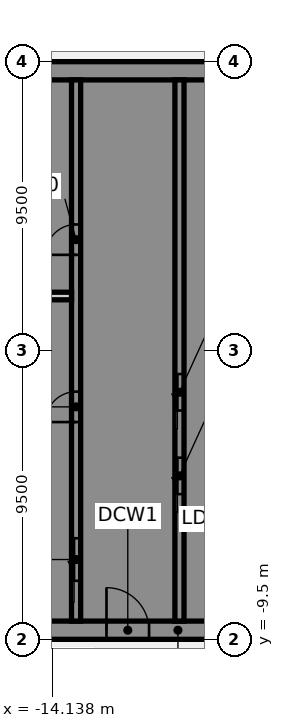
"""IFC4 building model, lengths in metres.
Left out: names, types, materials, properties, quantities, classifications, styles, units other than length and angle.
Written with IfcOpenShell. Run it as: python <this file> out.ifc"""

import sys

from ifc_helpers import new_model, si_unit, direction, frame, frame_2d, origin, place, context, subcontext, project, spatial, polyline, rectangle, outline, extrude, element, fill, save


model = new_model("IFC4")
c1 = context("Model", 3, precision=1e-05, world=origin(), true_north=direction((0.0, 1.0)))
c2 = subcontext(c1, "Body", "Model", "MODEL_VIEW")
j1 = project(units=[si_unit("LENGTHUNIT", "METRE"), si_unit("PLANEANGLEUNIT", "RADIAN")], contexts=[c1])
p1 = place(None, origin())
s1 = spatial("IfcSite", under=j1, at=p1, CompositionType="ELEMENT")
p2 = place(p1, origin())
s2 = spatial("IfcBuilding", under=s1, at=p2, CompositionType="ELEMENT")
p3 = place(p2, frame((0.0, 0.0, 151.75)))
s3 = spatial("IfcBuildingStorey", under=s2, at=p3, CompositionType="ELEMENT", Elevation=151.75)
p4 = place(p3, frame((-16.5, -9.2, 0.0), z_axis=(0.0, 0.0, 1.0), x_axis=(1.0, 0.0, 0.0)))
e1 = element("IfcWall", 1, at=p4, inside=s3, PredefinedType="SHEAR", context=c2, shape_type="SweptSolid", body=[
    extrude(rectangle(XDim=13.0, YDim=0.6, at=frame_2d((6.5, 0.0))), origin(), (0.0, 0.0, 1.0), 3.61),
])
p5 = place(p4, frame((4.15, 0.0, 0.0)))
e2 = element("IfcOpeningElement", 2, at=p5, cuts=e1, PredefinedType="OPENING", context=c2, shape_type="SweptSolid", body=[
    extrude(rectangle(XDim=1.4, YDim=2.1, at=frame_2d((0.7, 1.05))), frame((0.0, 0.31, 0.0), z_axis=(0.0, -1.0, 0.0), x_axis=(1.0, 0.0, 0.0)), (0.0, 0.0, 1.0), 0.62),
])
p6 = place(p4, frame((10.125, 0.0, 0.0)))
e3 = element("IfcOpeningElement", 3, at=p6, cuts=e1, PredefinedType="OPENING", context=c2, shape_type="SweptSolid", body=[
    extrude(rectangle(XDim=1.4, YDim=2.1, at=frame_2d((0.7, 1.05))), frame((0.0, 0.31, 0.0), z_axis=(0.0, -1.0, 0.0), x_axis=(1.0, 0.0, 0.0)), (0.0, 0.0, 1.0), 0.62),
])
p7 = place(p3, origin())
e4 = element("IfcWall", 4, at=p7, inside=s3, PredefinedType="SHEAR", context=c2, shape_type="SweptSolid", body=[
    extrude(outline(polyline([(-13.5, -8.125), (-15.9, -8.125), (-15.9, -5.625), (-13.5, -5.625), (-13.5, -5.375), (-15.9, -5.375), (-15.9, 5.375), (-13.5, 5.375), (-13.5, 5.625), (-15.9, 5.625), (-15.9, 8.125), (-13.5, 8.125), (-13.5, 8.9), (-15.9, 8.9), (-16.5, 8.9), (-16.5, -8.9), (-15.9, -8.9), (-13.5, -8.9), (-13.5, -8.125)])), origin(), (0.0, 0.0, 1.0), 3.61),
])
p8 = place(p3, frame((-16.5, 9.2, 0.0), z_axis=(0.0, 0.0, 1.0), x_axis=(1.0, 0.0, 0.0)))
e5 = element("IfcWall", 5, at=p8, inside=s3, PredefinedType="SHEAR", context=c2, shape_type="SweptSolid", body=[
    extrude(rectangle(XDim=13.0, YDim=0.6, at=frame_2d((6.5, 0.0))), origin(), (0.0, 0.0, 1.0), 3.61),
])
p9 = place(p3, origin())
e6 = element("IfcWall", 6, at=p9, inside=s3, PredefinedType="SHEAR", context=c2, shape_type="SweptSolid", body=[
    extrude(outline(polyline([(-9.8, -5.375), (-9.8, -5.625), (-7.5, -5.625), (-7.2, -5.625), (-7.2, 8.9), (-7.5, 8.9), (-9.8, 8.9), (-9.8, 8.125), (-7.5, 8.125), (-7.5, 5.625), (-9.8, 5.625), (-9.8, 5.375), (-7.5, 5.375), (-7.5, 2.875), (-9.8, 2.875), (-9.8, 2.625), (-7.5, 2.625), (-7.5, 0.125), (-9.8, 0.125), (-9.8, -0.125), (-7.5, -0.125), (-7.5, -2.625), (-9.8, -2.625), (-9.8, -2.875), (-7.5, -2.875), (-7.5, -5.375), (-9.8, -5.375)])), origin(), (0.0, 0.0, 1.0), 3.61),
])
p10 = place(p3, origin())
e7 = element("IfcWall", 7, at=p10, inside=s3, PredefinedType="SHEAR", context=c2, shape_type="SweptSolid", body=[
    extrude(outline(polyline([(-7.5, -8.125), (-9.55, -8.125), (-9.55, -5.625), (-9.8, -5.625), (-9.8, -8.125), (-9.8, -8.9), (-7.5, -8.9), (-7.5, -8.125)])), origin(), (0.0, 0.0, 1.0), 3.61),
])
p11 = place(p3, frame((-13.35, -8.9, 0.0), z_axis=(0.0, 0.0, 1.0), x_axis=(0.0, 1.0, 0.0)))
e8 = element("IfcWall", 8, at=p11, inside=s3, PredefinedType="SHEAR", context=c2, shape_type="SweptSolid", body=[
    extrude(rectangle(XDim=17.8, YDim=0.3, at=frame_2d((8.9, 0.0))), origin(), (0.0, 0.0, 1.0), 3.61),
])
p12 = place(p11, frame((1.325, 0.0, 0.0)))
e9 = element("IfcOpeningElement", 9, at=p12, cuts=e8, PredefinedType="OPENING", context=c2, shape_type="SweptSolid", body=[
    extrude(rectangle(XDim=1.4, YDim=2.1, at=frame_2d((0.7, 1.05))), frame((0.0, 0.16, 0.0), z_axis=(0.0, -1.0, 0.0), x_axis=(1.0, 0.0, 0.0)), (0.0, 0.0, 1.0), 0.32),
])
p13 = place(p11, frame((6.546, 0.0, 0.0)))
e10 = element("IfcOpeningElement", 10, at=p13, cuts=e8, PredefinedType="OPENING", context=c2, shape_type="SweptSolid", body=[
    extrude(rectangle(XDim=1.0, YDim=2.1, at=frame_2d((0.5, 1.05))), frame((0.0, 0.16, 0.0), z_axis=(0.0, -1.0, 0.0), x_axis=(1.0, 0.0, 0.0)), (0.0, 0.0, 1.0), 0.32),
])
p14 = place(p11, frame((12.046, 0.0, 0.0)))
e11 = element("IfcOpeningElement", 11, at=p14, cuts=e8, PredefinedType="OPENING", context=c2, shape_type="SweptSolid", body=[
    extrude(rectangle(XDim=1.0, YDim=2.1, at=frame_2d((0.5, 1.05))), frame((0.0, 0.16, 0.0), z_axis=(0.0, -1.0, 0.0), x_axis=(1.0, 0.0, 0.0)), (0.0, 0.0, 1.0), 0.32),
])
p15 = place(p3, frame((-9.95, -8.9, 0.0), z_axis=(0.0, 0.0, 1.0), x_axis=(0.0, 1.0, 0.0)))
e12 = element("IfcWall", 12, at=p15, inside=s3, PredefinedType="SHEAR", context=c2, shape_type="SweptSolid", body=[
    extrude(rectangle(XDim=17.8, YDim=0.3, at=frame_2d((8.9, 0.0))), origin(), (0.0, 0.0, 1.0), 3.61),
])
p16 = place(p15, frame((4.175, 0.0, 0.0)))
e13 = element("IfcOpeningElement", 13, at=p16, cuts=e12, PredefinedType="OPENING", context=c2, shape_type="SweptSolid", body=[
    extrude(rectangle(XDim=1.2, YDim=2.1, at=frame_2d((0.6, 1.05))), frame((0.0, 0.16, 0.0), z_axis=(0.0, -1.0, 0.0), x_axis=(1.0, 0.0, 0.0)), (0.0, 0.0, 1.0), 0.32),
])
p17 = place(p15, frame((6.925, 0.0, 0.0)))
e14 = element("IfcOpeningElement", 14, at=p17, cuts=e12, PredefinedType="OPENING", context=c2, shape_type="SweptSolid", body=[
    extrude(rectangle(XDim=1.2, YDim=2.1, at=frame_2d((0.6, 1.05))), frame((0.0, 0.16, 0.0), z_axis=(0.0, -1.0, 0.0), x_axis=(1.0, 0.0, 0.0)), (0.0, 0.0, 1.0), 0.32),
])
p18 = place(p3, frame((-15.8, 1.792, 0.0), z_axis=(0.0, 0.0, 1.0), x_axis=(1.0, 0.0, 0.0)))
e15 = element("IfcWall", 15, at=p18, inside=s3, PredefinedType="PARTITIONING", context=c2, shape_type="SweptSolid", body=[
    extrude(rectangle(XDim=2.3, YDim=0.25, at=frame_2d((1.15, 0.0))), origin(), (0.0, 0.0, 1.0), 3.61),
])
p19 = place(p5, origin())
e16 = element("IfcDoor", 16, at=p19, inside=s3, OperationType="SINGLE_SWING_LEFT", PredefinedType="DOOR", context=c2, shape_type="SweptSolid", body=[
    extrude(rectangle(XDim=1.4, YDim=2.1, at=frame_2d((0.7, 1.05))), frame((0.0, 0.025, 0.0), z_axis=(0.0, -1.0, 0.0), x_axis=(1.0, 0.0, 0.0)), (0.0, 0.0, 1.0), 0.05),
])
fill(e2, e16)
p20 = place(p12, origin())
e17 = element("IfcDoor", 17, at=p20, inside=s3, OperationType="SLIDING_TO_LEFT", PredefinedType="DOOR", context=c2, shape_type="SweptSolid", body=[
    extrude(rectangle(XDim=1.4, YDim=2.1, at=frame_2d((0.7, 1.05))), frame((0.0, 0.025, 0.0), z_axis=(0.0, -1.0, 0.0), x_axis=(1.0, 0.0, 0.0)), (0.0, 0.0, 1.0), 0.05),
])
fill(e9, e17)
p21 = place(p16, origin())
e18 = element("IfcDoor", 18, at=p21, inside=s3, OperationType="SLIDING_TO_LEFT", PredefinedType="DOOR", context=c2, shape_type="SweptSolid", body=[
    extrude(rectangle(XDim=1.2, YDim=2.1, at=frame_2d((0.6, 1.05))), frame((0.0, 0.025, 0.0), z_axis=(0.0, -1.0, 0.0), x_axis=(1.0, 0.0, 0.0)), (0.0, 0.0, 1.0), 0.05),
])
fill(e13, e18)
p22 = place(p17, origin())
e19 = element("IfcDoor", 19, at=p22, inside=s3, OperationType="SLIDING_TO_LEFT", PredefinedType="DOOR", context=c2, shape_type="SweptSolid", body=[
    extrude(rectangle(XDim=1.2, YDim=2.1, at=frame_2d((0.6, 1.05))), frame((0.0, 0.025, 0.0), z_axis=(0.0, -1.0, 0.0), x_axis=(1.0, 0.0, 0.0)), (0.0, 0.0, 1.0), 0.05),
])
fill(e14, e19)
p23 = place(p13, origin())
e20 = element("IfcDoor", 20, at=p23, inside=s3, OperationType="SINGLE_SWING_LEFT", PredefinedType="DOOR", context=c2, shape_type="SweptSolid", body=[
    extrude(rectangle(XDim=1.0, YDim=2.1, at=frame_2d((0.5, 1.05))), frame((0.0, 0.025, 0.0), z_axis=(0.0, -1.0, 0.0), x_axis=(1.0, 0.0, 0.0)), (0.0, 0.0, 1.0), 0.05),
])
fill(e10, e20)
p24 = place(p14, origin())
e21 = element("IfcDoor", 21, at=p24, inside=s3, OperationType="SINGLE_SWING_LEFT", PredefinedType="DOOR", context=c2, shape_type="SweptSolid", body=[
    extrude(rectangle(XDim=1.0, YDim=2.1, at=frame_2d((0.5, 1.05))), frame((0.0, 0.025, 0.0), z_axis=(0.0, -1.0, 0.0), x_axis=(1.0, 0.0, 0.0)), (0.0, 0.0, 1.0), 0.05),
])
fill(e11, e21)
save(model, sys.argv[1])
